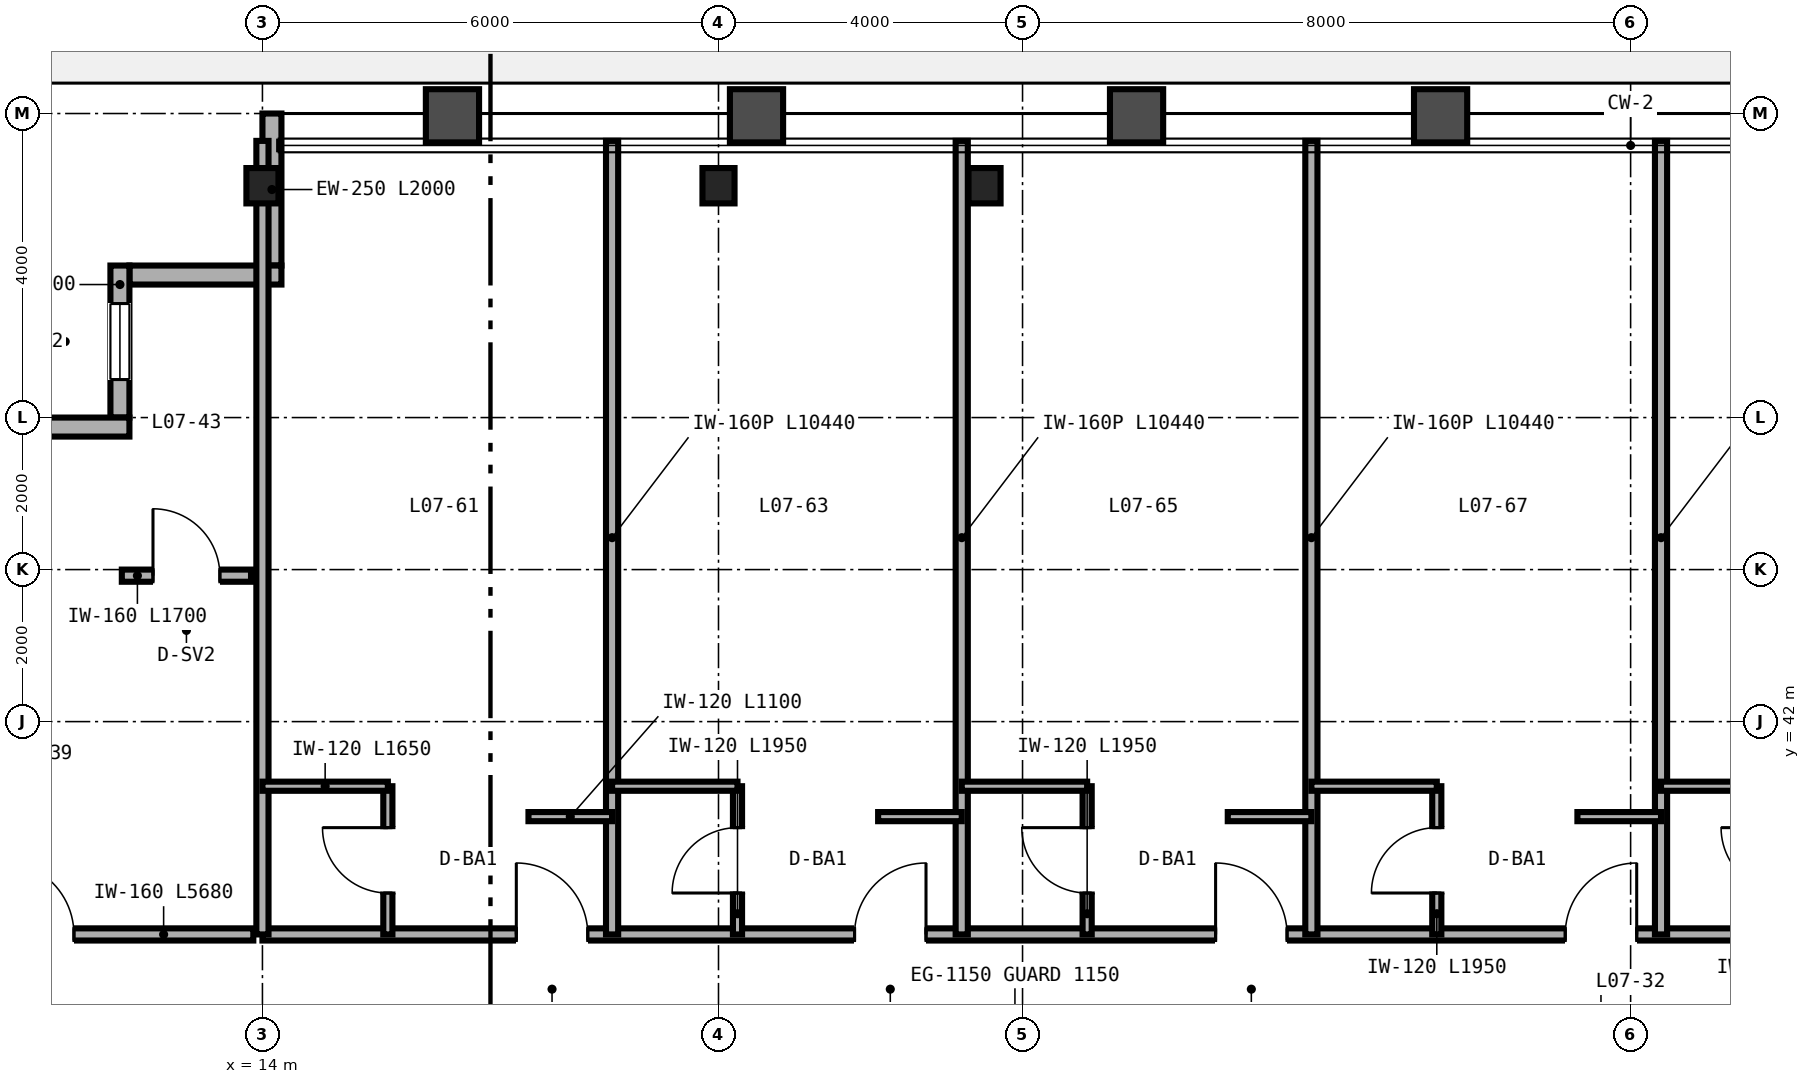
"""IFC4 building model, lengths in metres.
Left out: names, types, materials, properties, quantities, classifications, styles, units other than length and angle.
Written with IfcOpenShell. Run it as: python <this file> out.ifc"""

import sys

from ifc_helpers import new_model, si_unit, direction, frame, frame_2d, origin, origin_2d, place, context, subcontext, project, spatial, rectangle, i_section, extrude, source, transform, mapped, element, fill, save


model = new_model("IFC4")
c1 = context("Model", 3, precision=1e-05, world=origin(), true_north=direction((0.0, 1.0)))
c2 = subcontext(c1, "Body", "Model", "MODEL_VIEW")
j1 = project(units=[si_unit("LENGTHUNIT", "METRE"), si_unit("PLANEANGLEUNIT", "RADIAN")], contexts=[c1])
p1 = place(None, origin())
s1 = spatial("IfcSite", under=j1, at=p1, CompositionType="ELEMENT")
p2 = place(p1, origin())
s2 = spatial("IfcBuilding", under=s1, at=p2, CompositionType="ELEMENT")
p3 = place(p2, frame((0.0, 0.0, 34.8)))
s3 = spatial("IfcBuildingStorey", under=s2, at=p3, CompositionType="ELEMENT", Elevation=34.8)
m1 = source(origin(), c2, "Body", "SweptSolid", [
    extrude(i_section(OverallWidth=0.422, OverallDepth=0.465, WebThickness=0.045, FlangeThickness=0.073, FilletRadius=0.025, at=origin_2d()), origin(), (0.0, 0.0, 1.0), 3.35),
])
for number, where, z_axis, x_axis in (
    (1, (14.0, 49.05, 0.0), (0.0, 0.0, 1.0), (1.0, 0.0, 0.0)),
    (2, (20.0, 49.05, 0.0), (0.0, 0.0, 1.0), (1.0, 0.0, 0.0)),
    (3, (23.5, 49.05, 0.0), (0.0, 0.0, 1.0), (1.0, 0.0, 0.0)),
):
    element("IfcColumn", number, at=place(p3, frame(where, z_axis=z_axis, x_axis=x_axis)), inside=s3, PredefinedType="COLUMN", context=c2, shape_type="MappedRepresentation", body=[
        mapped(m1, transform((0.0, 0.0, 0.0), scale=1.0)),
    ])
p4 = place(p3, frame((14.125, 50.0, 0.0), z_axis=(0.0, 0.0, 1.0), x_axis=(0.0, -1.0, 0.0)))
e4 = element("IfcWall", 4, at=p4, inside=s3, PredefinedType="SOLIDWALL", context=c2, shape_type="SweptSolid", body=[
    extrude(rectangle(XDim=2.0, YDim=0.25, at=frame_2d((1.0, 0.0))), origin(), (0.0, 0.0, 1.0), 2.657),
])
p5 = place(p3, frame((14.25, 47.875, 0.0), z_axis=(0.0, 0.0, 1.0), x_axis=(-1.0, 0.0, 0.0)))
e5 = element("IfcWall", 5, at=p5, inside=s3, PredefinedType="SOLIDWALL", context=c2, shape_type="SweptSolid", body=[
    extrude(rectangle(XDim=2.0, YDim=0.25, at=frame_2d((1.0, 0.0))), origin(), (0.0, 0.0, 1.0), 3.35),
])
p6 = place(p3, frame((12.125, 48.0, 0.0), z_axis=(0.0, 0.0, 1.0), x_axis=(0.0, -1.0, 0.0)))
e6 = element("IfcWall", 6, at=p6, inside=s3, PredefinedType="SOLIDWALL", context=c2, shape_type="SweptSolid", body=[
    extrude(rectangle(XDim=2.0, YDim=0.25, at=frame_2d((1.0, 0.0))), origin(), (0.0, 0.0, 1.0), 3.35),
])
p7 = place(p6, frame((0.5, 0.0, 0.85)))
e7 = element("IfcOpeningElement", 7, at=p7, cuts=e6, PredefinedType="OPENING", context=c2, shape_type="SweptSolid", body=[
    extrude(rectangle(XDim=1.0, YDim=1.9, at=frame_2d((0.5, 0.95))), frame((0.0, 0.135, 0.0), z_axis=(0.0, -1.0, 0.0), x_axis=(1.0, 0.0, 0.0)), (0.0, 0.0, 1.0), 0.27),
])
p8 = place(p3, frame((12.25, 45.875, 0.0), z_axis=(0.0, 0.0, 1.0), x_axis=(-1.0, 0.0, 0.0)))
e8 = element("IfcWall", 8, at=p8, inside=s3, PredefinedType="SOLIDWALL", context=c2, shape_type="SweptSolid", body=[
    extrude(rectangle(XDim=2.0, YDim=0.25, at=frame_2d((1.0, 0.0))), origin(), (0.0, 0.0, 1.0), 3.35),
])
p9 = place(p3, frame((8.2, 39.2, 0.0), z_axis=(0.0, 0.0, 1.0), x_axis=(1.0, 0.0, 0.0)))
e9 = element("IfcWall", 9, at=p9, inside=s3, PredefinedType="PARTITIONING", context=c2, shape_type="SweptSolid", body=[
    extrude(rectangle(XDim=5.68, YDim=0.16, at=frame_2d((2.84, 0.0))), origin(), (0.0, 0.0, 1.0), 3.35),
])
p10 = place(p9, frame((2.36, 0.0, 0.0)))
e10 = element("IfcOpeningElement", 10, at=p10, cuts=e9, PredefinedType="OPENING", context=c2, shape_type="SweptSolid", body=[
    extrude(rectangle(XDim=0.96, YDim=2.15, at=frame_2d((0.48, 1.075))), frame((0.0, 0.09, 0.0), z_axis=(0.0, -1.0, 0.0), x_axis=(1.0, 0.0, 0.0)), (0.0, 0.0, 1.0), 0.18),
])
p11 = place(p3, frame((12.15, 43.92, 0.0), z_axis=(0.0, 0.0, 1.0), x_axis=(1.0, 0.0, 0.0)))
e11 = element("IfcWall", 11, at=p11, inside=s3, PredefinedType="PARTITIONING", context=c2, shape_type="SweptSolid", body=[
    extrude(rectangle(XDim=1.7, YDim=0.16, at=frame_2d((0.85, 0.0))), origin(), (0.0, 0.0, 1.0), 3.35),
])
p12 = place(p11, frame((0.41, 0.0, 0.0)))
e12 = element("IfcOpeningElement", 12, at=p12, cuts=e11, PredefinedType="OPENING", context=c2, shape_type="SweptSolid", body=[
    extrude(rectangle(XDim=0.88, YDim=2.15, at=frame_2d((0.44, 1.075))), frame((0.0, 0.09, 0.0), z_axis=(0.0, -1.0, 0.0), x_axis=(1.0, 0.0, 0.0)), (0.0, 0.0, 1.0), 0.18),
])
p13 = place(p3, frame((14.0, 39.2, 0.0), z_axis=(0.0, 0.0, 1.0), x_axis=(1.0, 0.0, 0.0)))
e13 = element("IfcWall", 13, at=p13, inside=s3, PredefinedType="PARTITIONING", context=c2, shape_type="SweptSolid", body=[
    extrude(rectangle(XDim=36.0, YDim=0.16, at=frame_2d((18.0, 0.0))), origin(), (0.0, 0.0, 1.0), 2.571),
])
p14 = place(p13, frame((3.34, 0.0, 0.0)))
e14 = element("IfcOpeningElement", 14, at=p14, cuts=e13, PredefinedType="OPENING", context=c2, shape_type="SweptSolid", body=[
    extrude(rectangle(XDim=0.94, YDim=2.15, at=frame_2d((0.47, 1.075))), frame((0.0, 0.09, 0.0), z_axis=(0.0, -1.0, 0.0), x_axis=(1.0, 0.0, 0.0)), (0.0, 0.0, 1.0), 0.18),
])
p15 = place(p13, frame((7.79, 0.0, 0.0)))
e15 = element("IfcOpeningElement", 15, at=p15, cuts=e13, PredefinedType="OPENING", context=c2, shape_type="SweptSolid", body=[
    extrude(rectangle(XDim=0.94, YDim=2.15, at=frame_2d((0.47, 1.075))), frame((0.0, 0.09, 0.0), z_axis=(0.0, -1.0, 0.0), x_axis=(1.0, 0.0, 0.0)), (0.0, 0.0, 1.0), 0.18),
])
p16 = place(p13, frame((12.54, 0.0, 0.0)))
e16 = element("IfcOpeningElement", 16, at=p16, cuts=e13, PredefinedType="OPENING", context=c2, shape_type="SweptSolid", body=[
    extrude(rectangle(XDim=0.94, YDim=2.15, at=frame_2d((0.47, 1.075))), frame((0.0, 0.09, 0.0), z_axis=(0.0, -1.0, 0.0), x_axis=(1.0, 0.0, 0.0)), (0.0, 0.0, 1.0), 0.18),
])
p17 = place(p13, frame((17.14, 0.0, 0.0)))
e17 = element("IfcOpeningElement", 17, at=p17, cuts=e13, PredefinedType="OPENING", context=c2, shape_type="SweptSolid", body=[
    extrude(rectangle(XDim=0.94, YDim=2.15, at=frame_2d((0.47, 1.075))), frame((0.0, 0.09, 0.0), z_axis=(0.0, -1.0, 0.0), x_axis=(1.0, 0.0, 0.0)), (0.0, 0.0, 1.0), 0.18),
])
p18 = place(p13, frame((21.74, 0.0, 0.0)))
e18 = element("IfcOpeningElement", 18, at=p18, cuts=e13, PredefinedType="OPENING", context=c2, shape_type="SweptSolid", body=[
    extrude(rectangle(XDim=0.94, YDim=2.15, at=frame_2d((0.47, 1.075))), frame((0.0, 0.09, 0.0), z_axis=(0.0, -1.0, 0.0), x_axis=(1.0, 0.0, 0.0)), (0.0, 0.0, 1.0), 0.18),
])
p19 = place(p13, frame((24.89, 0.0, 0.0)))
e19 = element("IfcOpeningElement", 19, at=p19, cuts=e13, PredefinedType="OPENING", context=c2, shape_type="SweptSolid", body=[
    extrude(rectangle(XDim=0.94, YDim=2.15, at=frame_2d((0.47, 1.075))), frame((0.0, 0.09, 0.0), z_axis=(0.0, -1.0, 0.0), x_axis=(1.0, 0.0, 0.0)), (0.0, 0.0, 1.0), 0.18),
])
p20 = place(p13, frame((30.54, 0.0, 0.0)))
e20 = element("IfcOpeningElement", 20, at=p20, cuts=e13, PredefinedType="OPENING", context=c2, shape_type="SweptSolid", body=[
    extrude(rectangle(XDim=0.94, YDim=2.15, at=frame_2d((0.47, 1.075))), frame((0.0, 0.09, 0.0), z_axis=(0.0, -1.0, 0.0), x_axis=(1.0, 0.0, 0.0)), (0.0, 0.0, 1.0), 0.18),
])
p21 = place(p13, frame((34.74, 0.0, 0.0)))
e21 = element("IfcOpeningElement", 21, at=p21, cuts=e13, PredefinedType="OPENING", context=c2, shape_type="SweptSolid", body=[
    extrude(rectangle(XDim=0.94, YDim=2.15, at=frame_2d((0.47, 1.075))), frame((0.0, 0.09, 0.0), z_axis=(0.0, -1.0, 0.0), x_axis=(1.0, 0.0, 0.0)), (0.0, 0.0, 1.0), 0.18),
])
for number, where, z_axis, x_axis in (
    (22, (14.0, 39.2, 0.0), (0.0, 0.0, 1.0), (0.0, 1.0, 0.0)),
    (23, (18.6, 39.2, 0.0), (0.0, 0.0, 1.0), (0.0, 1.0, 0.0)),
):
    element("IfcWall", number, at=place(p3, frame(where, z_axis=z_axis, x_axis=x_axis)), inside=s3, PredefinedType="PARTITIONING", context=c2, shape_type="SweptSolid", body=[
        extrude(rectangle(XDim=10.44, YDim=0.16, at=frame_2d((5.22, 0.0))), origin(), (0.0, 0.0, 1.0), 2.657),
    ])
p22 = place(p3, frame((15.65, 39.2, 0.0), z_axis=(0.0, 0.0, 1.0), x_axis=(0.0, 1.0, 0.0)))
e24 = element("IfcWall", 24, at=p22, inside=s3, PredefinedType="PARTITIONING", context=c2, shape_type="SweptSolid", body=[
    extrude(rectangle(XDim=1.95, YDim=0.12, at=frame_2d((0.975, 0.0))), origin(), (0.0, 0.0, 1.0), 3.35),
])
p23 = place(p22, frame((0.545, 0.0, 0.0)))
e25 = element("IfcOpeningElement", 25, at=p23, cuts=e24, PredefinedType="OPENING", context=c2, shape_type="SweptSolid", body=[
    extrude(rectangle(XDim=0.86, YDim=2.1, at=frame_2d((0.43, 1.05))), frame((0.0, 0.07, 0.0), z_axis=(0.0, -1.0, 0.0), x_axis=(1.0, 0.0, 0.0)), (0.0, 0.0, 1.0), 0.14),
])
p24 = place(p3, frame((14.0, 41.15, 0.0), z_axis=(0.0, 0.0, 1.0), x_axis=(1.0, 0.0, 0.0)))
e26 = element("IfcWall", 26, at=p24, inside=s3, PredefinedType="PARTITIONING", context=c2, shape_type="SweptSolid", body=[
    extrude(rectangle(XDim=1.65, YDim=0.12, at=frame_2d((0.825, 0.0))), origin(), (0.0, 0.0, 1.0), 3.35),
])
p25 = place(p3, frame((17.5, 40.75, 0.0), z_axis=(0.0, 0.0, 1.0), x_axis=(1.0, 0.0, 0.0)))
e27 = element("IfcWall", 27, at=p25, inside=s3, PredefinedType="PARTITIONING", context=c2, shape_type="SweptSolid", body=[
    extrude(rectangle(XDim=1.1, YDim=0.12, at=frame_2d((0.55, 0.0))), origin(), (0.0, 0.0, 1.0), 3.35),
])
p26 = place(p3, frame((23.2, 39.2, 0.0), z_axis=(0.0, 0.0, 1.0), x_axis=(0.0, 1.0, 0.0)))
e28 = element("IfcWall", 28, at=p26, inside=s3, PredefinedType="PARTITIONING", context=c2, shape_type="SweptSolid", body=[
    extrude(rectangle(XDim=10.44, YDim=0.16, at=frame_2d((5.22, 0.0))), origin(), (0.0, 0.0, 1.0), 2.813),
])
p27 = place(p3, frame((20.25, 39.2, 0.0), z_axis=(0.0, 0.0, 1.0), x_axis=(0.0, 1.0, 0.0)))
e29 = element("IfcWall", 29, at=p27, inside=s3, PredefinedType="PARTITIONING", context=c2, shape_type="SweptSolid", body=[
    extrude(rectangle(XDim=1.95, YDim=0.12, at=frame_2d((0.975, 0.0))), origin(), (0.0, 0.0, 1.0), 3.35),
])
p28 = place(p27, frame((0.545, 0.0, 0.0)))
e30 = element("IfcOpeningElement", 30, at=p28, cuts=e29, PredefinedType="OPENING", context=c2, shape_type="SweptSolid", body=[
    extrude(rectangle(XDim=0.86, YDim=2.1, at=frame_2d((0.43, 1.05))), frame((0.0, 0.07, 0.0), z_axis=(0.0, -1.0, 0.0), x_axis=(1.0, 0.0, 0.0)), (0.0, 0.0, 1.0), 0.14),
])
p29 = place(p3, frame((18.6, 41.15, 0.0), z_axis=(0.0, 0.0, 1.0), x_axis=(1.0, 0.0, 0.0)))
e31 = element("IfcWall", 31, at=p29, inside=s3, PredefinedType="PARTITIONING", context=c2, shape_type="SweptSolid", body=[
    extrude(rectangle(XDim=1.65, YDim=0.12, at=frame_2d((0.825, 0.0))), origin(), (0.0, 0.0, 1.0), 3.35),
])
p30 = place(p3, frame((22.1, 40.75, 0.0), z_axis=(0.0, 0.0, 1.0), x_axis=(1.0, 0.0, 0.0)))
e32 = element("IfcWall", 32, at=p30, inside=s3, PredefinedType="PARTITIONING", context=c2, shape_type="SweptSolid", body=[
    extrude(rectangle(XDim=1.1, YDim=0.12, at=frame_2d((0.55, 0.0))), origin(), (0.0, 0.0, 1.0), 3.35),
])
p31 = place(p3, frame((27.8, 39.2, 0.0), z_axis=(0.0, 0.0, 1.0), x_axis=(0.0, 1.0, 0.0)))
e33 = element("IfcWall", 33, at=p31, inside=s3, PredefinedType="PARTITIONING", context=c2, shape_type="SweptSolid", body=[
    extrude(rectangle(XDim=10.44, YDim=0.16, at=frame_2d((5.22, 0.0))), origin(), (0.0, 0.0, 1.0), 2.423),
])
p32 = place(p3, frame((24.85, 39.2, 0.0), z_axis=(0.0, 0.0, 1.0), x_axis=(0.0, 1.0, 0.0)))
e34 = element("IfcWall", 34, at=p32, inside=s3, PredefinedType="PARTITIONING", context=c2, shape_type="SweptSolid", body=[
    extrude(rectangle(XDim=1.95, YDim=0.12, at=frame_2d((0.975, 0.0))), origin(), (0.0, 0.0, 1.0), 3.35),
])
p33 = place(p32, frame((0.545, 0.0, 0.0)))
e35 = element("IfcOpeningElement", 35, at=p33, cuts=e34, PredefinedType="OPENING", context=c2, shape_type="SweptSolid", body=[
    extrude(rectangle(XDim=0.86, YDim=2.1, at=frame_2d((0.43, 1.05))), frame((0.0, 0.07, 0.0), z_axis=(0.0, -1.0, 0.0), x_axis=(1.0, 0.0, 0.0)), (0.0, 0.0, 1.0), 0.14),
])
p34 = place(p3, frame((23.2, 41.15, 0.0), z_axis=(0.0, 0.0, 1.0), x_axis=(1.0, 0.0, 0.0)))
e36 = element("IfcWall", 36, at=p34, inside=s3, PredefinedType="PARTITIONING", context=c2, shape_type="SweptSolid", body=[
    extrude(rectangle(XDim=1.65, YDim=0.12, at=frame_2d((0.825, 0.0))), origin(), (0.0, 0.0, 1.0), 2.571),
])
p35 = place(p3, frame((26.7, 40.75, 0.0), z_axis=(0.0, 0.0, 1.0), x_axis=(1.0, 0.0, 0.0)))
e37 = element("IfcWall", 37, at=p35, inside=s3, PredefinedType="PARTITIONING", context=c2, shape_type="SweptSolid", body=[
    extrude(rectangle(XDim=1.1, YDim=0.12, at=frame_2d((0.55, 0.0))), origin(), (0.0, 0.0, 1.0), 3.35),
])
p36 = place(p3, frame((32.4, 39.2, 0.0), z_axis=(0.0, 0.0, 1.0), x_axis=(0.0, 1.0, 0.0)))
e38 = element("IfcWall", 38, at=p36, inside=s3, PredefinedType="PARTITIONING", context=c2, shape_type="SweptSolid", body=[
    extrude(rectangle(XDim=10.44, YDim=0.16, at=frame_2d((5.22, 0.0))), origin(), (0.0, 0.0, 1.0), 2.423),
])
p37 = place(p3, frame((29.45, 39.2, 0.0), z_axis=(0.0, 0.0, 1.0), x_axis=(0.0, 1.0, 0.0)))
e39 = element("IfcWall", 39, at=p37, inside=s3, PredefinedType="PARTITIONING", context=c2, shape_type="SweptSolid", body=[
    extrude(rectangle(XDim=1.95, YDim=0.12, at=frame_2d((0.975, 0.0))), origin(), (0.0, 0.0, 1.0), 3.35),
])
p38 = place(p37, frame((0.545, 0.0, 0.0)))
e40 = element("IfcOpeningElement", 40, at=p38, cuts=e39, PredefinedType="OPENING", context=c2, shape_type="SweptSolid", body=[
    extrude(rectangle(XDim=0.86, YDim=2.1, at=frame_2d((0.43, 1.05))), frame((0.0, 0.07, 0.0), z_axis=(0.0, -1.0, 0.0), x_axis=(1.0, 0.0, 0.0)), (0.0, 0.0, 1.0), 0.14),
])
p39 = place(p3, frame((27.8, 41.15, 0.0), z_axis=(0.0, 0.0, 1.0), x_axis=(1.0, 0.0, 0.0)))
e41 = element("IfcWall", 41, at=p39, inside=s3, PredefinedType="PARTITIONING", context=c2, shape_type="SweptSolid", body=[
    extrude(rectangle(XDim=1.65, YDim=0.12, at=frame_2d((0.825, 0.0))), origin(), (0.0, 0.0, 1.0), 3.35),
])
p40 = place(p3, frame((31.3, 40.75, 0.0), z_axis=(0.0, 0.0, 1.0), x_axis=(1.0, 0.0, 0.0)))
e42 = element("IfcWall", 42, at=p40, inside=s3, PredefinedType="PARTITIONING", context=c2, shape_type="SweptSolid", body=[
    extrude(rectangle(XDim=1.1, YDim=0.12, at=frame_2d((0.55, 0.0))), origin(), (0.0, 0.0, 1.0), 3.35),
])
p41 = place(p3, frame((32.4, 41.15, 0.0), z_axis=(0.0, 0.0, 1.0), x_axis=(1.0, 0.0, 0.0)))
e43 = element("IfcWall", 43, at=p41, inside=s3, PredefinedType="PARTITIONING", context=c2, shape_type="SweptSolid", body=[
    extrude(rectangle(XDim=1.65, YDim=0.12, at=frame_2d((0.825, 0.0))), origin(), (0.0, 0.0, 1.0), 3.35),
])
m2 = source(origin(), c2, "Body", "SweptSolid", [
    extrude(rectangle(XDim=1.0, YDim=1.9, at=frame_2d((0.5, 0.95))), frame((0.0, 0.03, 0.0), z_axis=(0.0, -1.0, 0.0), x_axis=(1.0, 0.0, 0.0)), (0.0, 0.0, 1.0), 0.06),
])
p42 = place(p7, origin())
e44 = element("IfcWindow", 44, at=p42, inside=s3, PartitioningType="SINGLE_PANEL", PredefinedType="WINDOW", context=c2, shape_type="MappedRepresentation", body=[
    mapped(m2, transform((0.0, 0.0, 0.0), scale=1.0)),
])
fill(e7, e44)
m3 = source(origin(), c2, "Body", "SweptSolid", [
    extrude(rectangle(XDim=0.96, YDim=2.15, at=frame_2d((0.48, 1.075))), frame((0.0, 0.025, 0.0), z_axis=(0.0, -1.0, 0.0), x_axis=(1.0, 0.0, 0.0)), (0.0, 0.0, 1.0), 0.05),
])
p43 = place(p10, origin())
e45 = element("IfcDoor", 45, at=p43, inside=s3, OperationType="SINGLE_SWING_LEFT", PredefinedType="DOOR", context=c2, shape_type="MappedRepresentation", body=[
    mapped(m3, transform((0.0, 0.0, 0.0), scale=1.0)),
])
fill(e10, e45)
m4 = source(origin(), c2, "Body", "SweptSolid", [
    extrude(rectangle(XDim=0.88, YDim=2.15, at=frame_2d((0.44, 1.075))), frame((0.0, 0.025, 0.0), z_axis=(0.0, -1.0, 0.0), x_axis=(1.0, 0.0, 0.0)), (0.0, 0.0, 1.0), 0.05),
])
p44 = place(p12, origin())
e46 = element("IfcDoor", 46, at=p44, inside=s3, OperationType="SINGLE_SWING_LEFT", PredefinedType="DOOR", context=c2, shape_type="MappedRepresentation", body=[
    mapped(m4, transform((0.0, 0.0, 0.0), scale=1.0)),
])
fill(e12, e46)
m5 = source(origin(), c2, "Body", "SweptSolid", [
    extrude(rectangle(XDim=0.86, YDim=2.1, at=frame_2d((0.43, 1.05))), frame((0.0, 0.025, 0.0), z_axis=(0.0, -1.0, 0.0), x_axis=(1.0, 0.0, 0.0)), (0.0, 0.0, 1.0), 0.05),
])
p45 = place(p23, origin())
e47 = element("IfcDoor", 47, at=p45, inside=s3, OperationType="SINGLE_SWING_RIGHT", PredefinedType="DOOR", context=c2, shape_type="MappedRepresentation", body=[
    mapped(m5, transform((0.0, 0.0, 0.0), scale=1.0)),
])
fill(e25, e47)
p46 = place(p28, origin())
e48 = element("IfcDoor", 48, at=p46, inside=s3, OperationType="SINGLE_SWING_LEFT", PredefinedType="DOOR", context=c2, shape_type="MappedRepresentation", body=[
    mapped(m5, transform((0.0, 0.0, 0.0), scale=1.0)),
])
fill(e30, e48)
p47 = place(p33, origin())
e49 = element("IfcDoor", 49, at=p47, inside=s3, OperationType="SINGLE_SWING_RIGHT", PredefinedType="DOOR", context=c2, shape_type="MappedRepresentation", body=[
    mapped(m5, transform((0.0, 0.0, 0.0), scale=1.0)),
])
fill(e35, e49)
p48 = place(p38, origin())
e50 = element("IfcDoor", 50, at=p48, inside=s3, OperationType="SINGLE_SWING_LEFT", PredefinedType="DOOR", context=c2, shape_type="MappedRepresentation", body=[
    mapped(m5, transform((0.0, 0.0, 0.0), scale=1.0)),
])
fill(e40, e50)
m6 = source(origin(), c2, "Body", "SweptSolid", [
    extrude(rectangle(XDim=0.94, YDim=2.15, at=frame_2d((0.47, 1.075))), frame((0.0, 0.025, 0.0), z_axis=(0.0, -1.0, 0.0), x_axis=(1.0, 0.0, 0.0)), (0.0, 0.0, 1.0), 0.05),
])
p49 = place(p14, origin())
e51 = element("IfcDoor", 51, at=p49, inside=s3, OperationType="SINGLE_SWING_LEFT", PredefinedType="DOOR", context=c2, shape_type="MappedRepresentation", body=[
    mapped(m6, transform((0.0, 0.0, 0.0), scale=1.0)),
])
fill(e14, e51)
p50 = place(p15, origin())
e52 = element("IfcDoor", 52, at=p50, inside=s3, OperationType="SINGLE_SWING_RIGHT", PredefinedType="DOOR", context=c2, shape_type="MappedRepresentation", body=[
    mapped(m6, transform((0.0, 0.0, 0.0), scale=1.0)),
])
fill(e15, e52)
p51 = place(p16, origin())
e53 = element("IfcDoor", 53, at=p51, inside=s3, OperationType="SINGLE_SWING_LEFT", PredefinedType="DOOR", context=c2, shape_type="MappedRepresentation", body=[
    mapped(m6, transform((0.0, 0.0, 0.0), scale=1.0)),
])
fill(e16, e53)
p52 = place(p17, origin())
e54 = element("IfcDoor", 54, at=p52, inside=s3, OperationType="SINGLE_SWING_RIGHT", PredefinedType="DOOR", context=c2, shape_type="MappedRepresentation", body=[
    mapped(m6, transform((0.0, 0.0, 0.0), scale=1.0)),
])
fill(e17, e54)
save(model, sys.argv[1])
